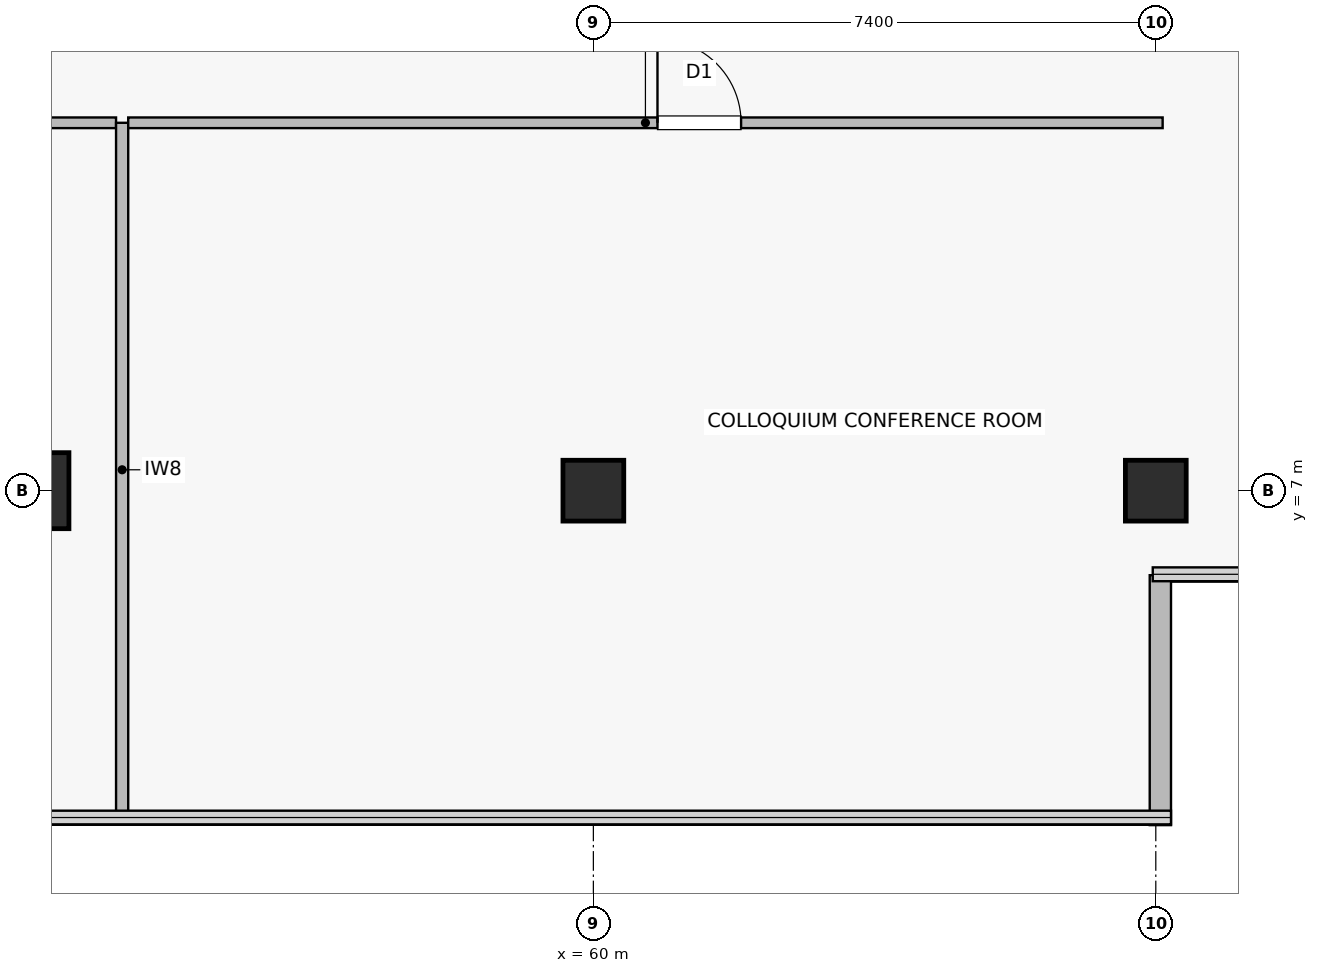
"""IFC4 building model, lengths in metres.
Left out: names, types, materials, properties, quantities, classifications, styles, units other than length and angle.
Written with IfcOpenShell. Run it as: python <this file> out.ifc"""

import sys

from ifc_helpers import new_model, si_unit, direction, frame, frame_2d, origin, origin_2d, place, context, subcontext, project, spatial, rectangle, extrude, source, transform, mapped, element, fill, save


model = new_model("IFC4")
c1 = context("Model", 3, precision=1e-05, world=origin(), true_north=direction((0.0, 1.0)))
c2 = subcontext(c1, "Body", "Model", "MODEL_VIEW")
j1 = project(units=[si_unit("LENGTHUNIT", "METRE"), si_unit("PLANEANGLEUNIT", "RADIAN")], contexts=[c1])
p1 = place(None, origin())
s1 = spatial("IfcSite", under=j1, at=p1, CompositionType="ELEMENT")
p2 = place(p1, origin())
s2 = spatial("IfcBuilding", under=s1, at=p2, CompositionType="ELEMENT")
p3 = place(p2, frame((0.0, 0.0, 213.7)))
s3 = spatial("IfcBuildingStorey", under=s2, at=p3, CompositionType="ELEMENT", Elevation=213.7)
m1 = source(origin(), c2, "Body", "SweptSolid", [
    extrude(rectangle(XDim=1.0, YDim=1.0, at=origin_2d()), origin(), (0.0, 0.0, 1.0), 4.1),
])
p4 = place(p3, frame((52.6, 7.0, 0.0), z_axis=(0.0, 0.0, 1.0), x_axis=(1.0, 0.0, 0.0)))
e1 = element("IfcColumn", 1, at=p4, inside=s3, PredefinedType="COLUMN", context=c2, shape_type="MappedRepresentation", body=[
    mapped(m1, transform((0.0, 0.0, 0.0), scale=1.0)),
])
m2 = source(origin(), c2, "Body", "SweptSolid", [
    extrude(rectangle(XDim=0.8, YDim=0.8, at=origin_2d()), origin(), (0.0, 0.0, 1.0), 4.1),
])
for number, where, z_axis, x_axis in (
    (2, (60.0, 7.0, 0.0), (0.0, 0.0, 1.0), (1.0, 0.0, 0.0)),
    (3, (67.4, 7.0, 0.0), (0.0, 0.0, 1.0), (1.0, 0.0, 0.0)),
):
    element("IfcColumn", number, at=place(p3, frame(where, z_axis=z_axis, x_axis=x_axis)), inside=s3, PredefinedType="COLUMN", context=c2, shape_type="MappedRepresentation", body=[
        mapped(m2, transform((0.0, 0.0, 0.0), scale=1.0)),
    ])
p5 = place(p3, frame((67.46, 2.6, 0.0), z_axis=(0.0, 0.0, 1.0), x_axis=(0.0, 1.0, 0.0)))
e4 = element("IfcWall", 4, at=p5, inside=s3, PredefinedType="STANDARD", context=c2, shape_type="SweptSolid", body=[
    extrude(rectangle(XDim=3.288, YDim=0.28, at=frame_2d((1.644, 0.0))), origin(), (0.0, 0.0, 1.0), 3.8),
])
p6 = place(p3, frame((35.28, 11.84, 0.0), z_axis=(0.0, 0.0, 1.0), x_axis=(1.0, 0.0, 0.0)))
e5 = element("IfcWall", 5, at=p6, inside=s3, PredefinedType="PARTITIONING", context=c2, shape_type="SweptSolid", body=[
    extrude(rectangle(XDim=18.44, YDim=0.14, at=frame_2d((9.22, 0.0))), origin(), (0.0, 0.0, 1.0), 3.197),
])
p7 = place(p6, frame((7.672, 0.0, 0.0)))
e6 = element("IfcOpeningElement", 6, at=p7, cuts=e5, PredefinedType="OPENING", context=c2, shape_type="SweptSolid", body=[
    extrude(rectangle(XDim=1.1, YDim=2.18, at=frame_2d((0.55, 1.09))), frame((0.0, 0.08, 0.0), z_axis=(0.0, -1.0, 0.0), x_axis=(1.0, 0.0, 0.0)), (0.0, 0.0, 1.0), 0.16),
])
p8 = place(p3, frame((53.8, 2.71, 0.0), z_axis=(0.0, 0.0, 1.0), x_axis=(0.0, 1.0, 0.0)))
e7 = element("IfcWall", 7, at=p8, inside=s3, PredefinedType="PARTITIONING", context=c2, shape_type="SweptSolid", body=[
    extrude(rectangle(XDim=9.13, YDim=0.16, at=frame_2d((4.565, 0.0))), origin(), (0.0, 0.0, 1.0), 3.135),
])
p9 = place(p3, frame((53.88, 11.84, 0.0), z_axis=(0.0, 0.0, 1.0), x_axis=(1.0, 0.0, 0.0)))
e8 = element("IfcWall", 8, at=p9, inside=s3, PredefinedType="PARTITIONING", context=c2, shape_type="SweptSolid", body=[
    extrude(rectangle(XDim=13.61, YDim=0.14, at=frame_2d((6.805, 0.0))), origin(), (0.0, 0.0, 1.0), 3.197),
])
p10 = place(p9, frame((6.964, 0.0, 0.0)))
e9 = element("IfcOpeningElement", 9, at=p10, cuts=e8, PredefinedType="OPENING", context=c2, shape_type="SweptSolid", body=[
    extrude(rectangle(XDim=1.1, YDim=2.18, at=frame_2d((0.55, 1.09))), frame((0.0, 0.08, 0.0), z_axis=(0.0, -1.0, 0.0), x_axis=(1.0, 0.0, 0.0)), (0.0, 0.0, 1.0), 0.16),
])
m3 = source(origin(), c2, "Body", "SweptSolid", [
    extrude(rectangle(XDim=1.1, YDim=2.18, at=frame_2d((0.55, 1.09))), frame((0.0, 0.025, 0.0), z_axis=(0.0, -1.0, 0.0), x_axis=(1.0, 0.0, 0.0)), (0.0, 0.0, 1.0), 0.05),
])
p11 = place(p10, origin())
e10 = element("IfcDoor", 10, at=p11, inside=s3, OperationType="SINGLE_SWING_LEFT", PredefinedType="DOOR", context=c2, shape_type="MappedRepresentation", body=[
    mapped(m3, transform((0.0, 0.0, 0.0), scale=1.0)),
])
fill(e9, e10)
save(model, sys.argv[1])
